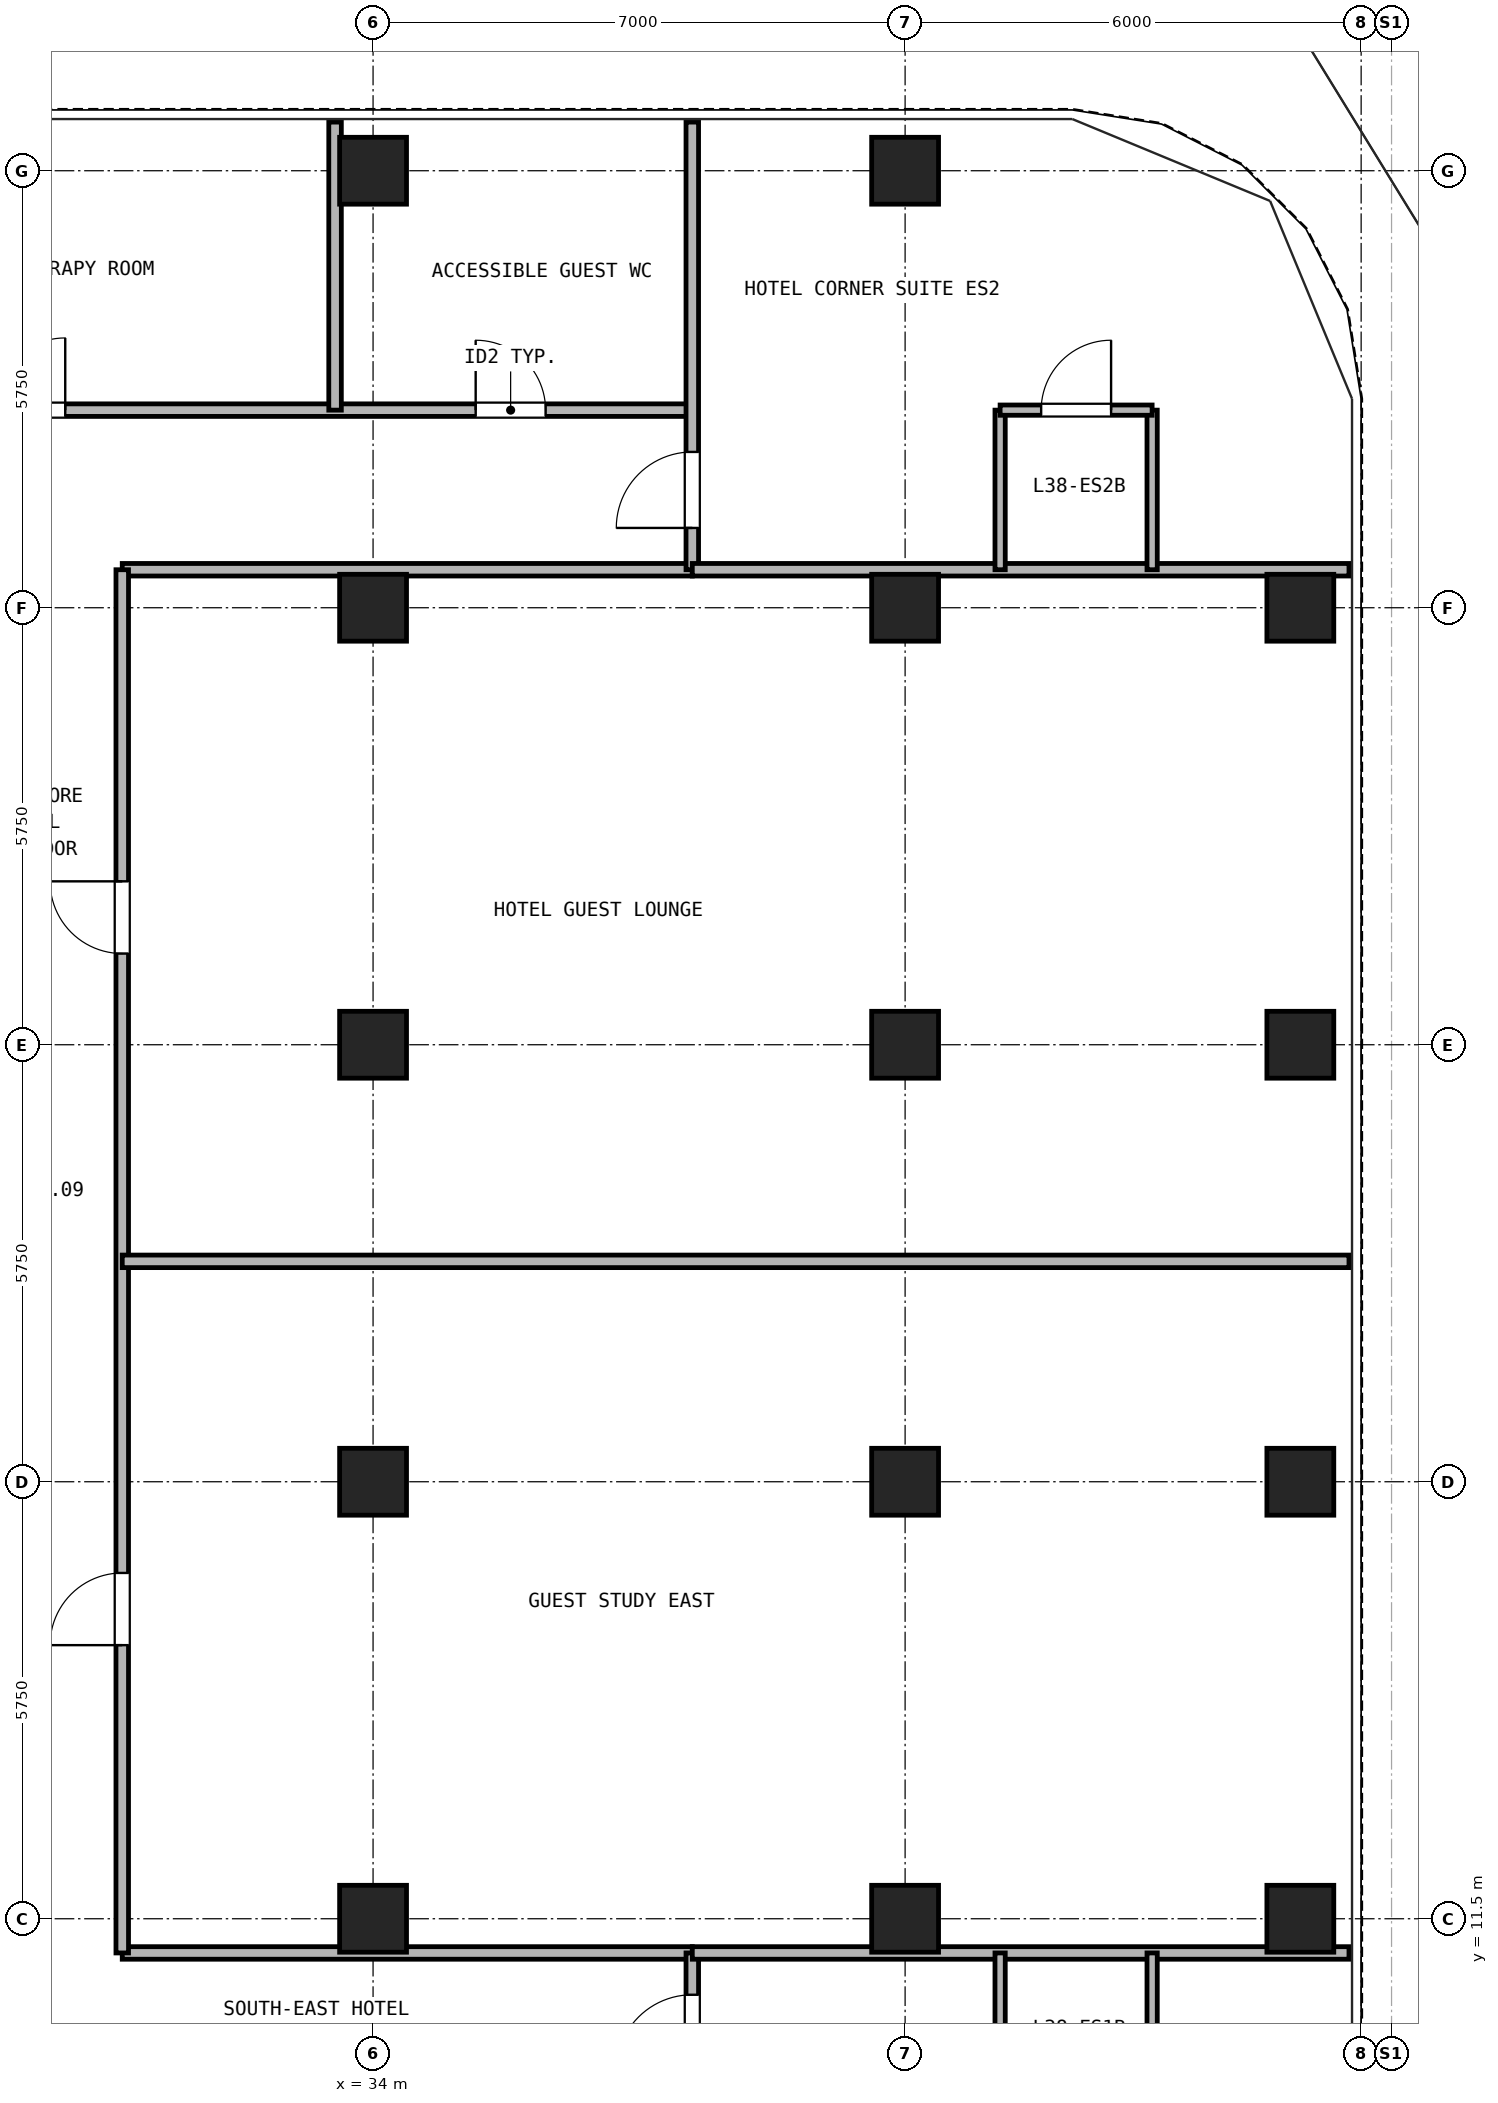
"""IFC4 building model, lengths in metres.
Left out: names, types, materials, properties, quantities, classifications, styles, units other than length and angle.
Written with IfcOpenShell. Run it as: python <this file> out.ifc"""

import sys

from ifc_helpers import new_model, si_unit, direction, frame, frame_2d, origin, origin_2d, place, context, subcontext, project, spatial, rectangle, hollow_rectangle, extrude, source, transform, mapped, element, fill, save


model = new_model("IFC4")
c1 = context("Model", 3, precision=1e-05, world=origin(), true_north=direction((0.0, 1.0)))
c2 = subcontext(c1, "Body", "Model", "MODEL_VIEW")
j1 = project(units=[si_unit("LENGTHUNIT", "METRE"), si_unit("PLANEANGLEUNIT", "RADIAN")], contexts=[c1])
p1 = place(None, origin())
s1 = spatial("IfcSite", under=j1, at=p1, CompositionType="ELEMENT")
p2 = place(p1, origin())
s2 = spatial("IfcBuilding", under=s1, at=p2, CompositionType="ELEMENT")
p3 = place(p2, frame((0.0, 0.0, 137.5)))
s3 = spatial("IfcBuildingStorey", under=s2, at=p3, CompositionType="ELEMENT", Elevation=137.5)
m1 = source(origin(), c2, "Body", "SweptSolid", [
    extrude(hollow_rectangle(XDim=0.88, YDim=0.88, WallThickness=0.05, at=origin_2d()), origin(), (0.0, 0.0, 1.0), 2.95),
])
for number, where, z_axis, x_axis in (
    (1, (34.0, 34.5, 0.0), (0.0, 0.0, 1.0), (1.0, 0.0, 0.0)),
    (2, (41.0, 34.5, 0.0), (0.0, 0.0, 1.0), (1.0, 0.0, 0.0)),
    (3, (46.2, 11.5, 0.0), (0.0, 0.0, 1.0), (1.0, 0.0, 0.0)),
    (4, (46.2, 17.25, 0.0), (0.0, 0.0, 1.0), (1.0, 0.0, 0.0)),
    (5, (46.2, 23.0, 0.0), (0.0, 0.0, 1.0), (1.0, 0.0, 0.0)),
    (6, (46.2, 28.75, 0.0), (0.0, 0.0, 1.0), (1.0, 0.0, 0.0)),
    (7, (34.0, 11.5, 0.0), (0.0, 0.0, 1.0), (1.0, 0.0, 0.0)),
    (8, (34.0, 17.25, 0.0), (0.0, 0.0, 1.0), (1.0, 0.0, 0.0)),
    (9, (34.0, 23.0, 0.0), (0.0, 0.0, 1.0), (1.0, 0.0, 0.0)),
    (10, (34.0, 28.75, 0.0), (0.0, 0.0, 1.0), (1.0, 0.0, 0.0)),
    (11, (41.0, 11.5, 0.0), (0.0, 0.0, 1.0), (1.0, 0.0, 0.0)),
    (12, (41.0, 17.25, 0.0), (0.0, 0.0, 1.0), (1.0, 0.0, 0.0)),
    (13, (41.0, 23.0, 0.0), (0.0, 0.0, 1.0), (1.0, 0.0, 0.0)),
    (14, (41.0, 28.75, 0.0), (0.0, 0.0, 1.0), (1.0, 0.0, 0.0)),
):
    element("IfcColumn", number, at=place(p3, frame(where, z_axis=z_axis, x_axis=x_axis)), inside=s3, PredefinedType="COLUMN", context=c2, shape_type="MappedRepresentation", body=[
        mapped(m1, transform((0.0, 0.0, 0.0), x_axis=(1.0, 0.0, 0.0), y_axis=(0.0, 1.0, 0.0), z_axis=(0.0, 0.0, 1.0), scale=1.0)),
    ])
p4 = place(p3, frame((8.8, 31.35, 0.0), z_axis=(0.0, 0.0, 1.0), x_axis=(1.0, 0.0, 0.0)))
e15 = element("IfcWall", 15, at=p4, inside=s3, PredefinedType="PARTITIONING", context=c2, shape_type="SweptSolid", body=[
    extrude(rectangle(XDim=29.4, YDim=0.165, at=frame_2d((14.7, 0.0))), origin(), (0.0, 0.0, 1.0), 2.95),
])
p5 = place(p4, frame((3.35, 0.0, 0.0)))
e16 = element("IfcOpeningElement", 16, at=p5, cuts=e15, PredefinedType="OPENING", context=c2, shape_type="SweptSolid", body=[
    extrude(rectangle(XDim=0.95, YDim=2.15, at=frame_2d((0.475, 1.075))), frame((0.0, 0.093, 0.0), z_axis=(0.0, -1.0, 0.0), x_axis=(1.0, 0.0, 0.0)), (0.0, 0.0, 1.0), 0.185),
])
p6 = place(p4, frame((11.7, 0.0, 0.0)))
e17 = element("IfcOpeningElement", 17, at=p6, cuts=e15, PredefinedType="OPENING", context=c2, shape_type="SweptSolid", body=[
    extrude(rectangle(XDim=0.95, YDim=2.15, at=frame_2d((0.475, 1.075))), frame((0.0, 0.093, 0.0), z_axis=(0.0, -1.0, 0.0), x_axis=(1.0, 0.0, 0.0)), (0.0, 0.0, 1.0), 0.185),
])
p7 = place(p4, frame((20.2, 0.0, 0.0)))
e18 = element("IfcOpeningElement", 18, at=p7, cuts=e15, PredefinedType="OPENING", context=c2, shape_type="SweptSolid", body=[
    extrude(rectangle(XDim=0.95, YDim=2.15, at=frame_2d((0.475, 1.075))), frame((0.0, 0.093, 0.0), z_axis=(0.0, -1.0, 0.0), x_axis=(1.0, 0.0, 0.0)), (0.0, 0.0, 1.0), 0.185),
])
p8 = place(p4, frame((26.55, 0.0, 0.0)))
e19 = element("IfcOpeningElement", 19, at=p8, cuts=e15, PredefinedType="OPENING", context=c2, shape_type="SweptSolid", body=[
    extrude(rectangle(XDim=0.92, YDim=2.1, at=frame_2d((0.46, 1.05))), frame((0.0, 0.093, 0.0), z_axis=(0.0, -1.0, 0.0), x_axis=(1.0, 0.0, 0.0)), (0.0, 0.0, 1.0), 0.185),
])
for number, where, z_axis, x_axis in (
    (20, (30.7, 11.05, 0.0), (0.0, 0.0, 1.0), (1.0, 0.0, 0.0)),
    (21, (30.7, 29.25, 0.0), (0.0, 0.0, 1.0), (1.0, 0.0, 0.0)),
):
    element("IfcWall", number, at=place(p3, frame(where, z_axis=z_axis, x_axis=x_axis)), inside=s3, PredefinedType="PARTITIONING", context=c2, shape_type="SweptSolid", body=[
        extrude(rectangle(XDim=7.5, YDim=0.165, at=frame_2d((3.75, 0.0))), origin(), (0.0, 0.0, 1.0), 2.95),
    ])
p9 = place(p3, frame((30.7, 11.05, 0.0), z_axis=(0.0, 0.0, 1.0), x_axis=(0.0, 1.0, 0.0)))
e22 = element("IfcWall", 22, at=p9, inside=s3, PredefinedType="PARTITIONING", context=c2, shape_type="SweptSolid", body=[
    extrude(rectangle(XDim=18.2, YDim=0.165, at=frame_2d((9.1, 0.0))), origin(), (0.0, 0.0, 1.0), 2.95),
])
p10 = place(p9, frame((4.05, 0.0, 0.0)))
e23 = element("IfcOpeningElement", 23, at=p10, cuts=e22, PredefinedType="OPENING", context=c2, shape_type="SweptSolid", body=[
    extrude(rectangle(XDim=0.95, YDim=2.15, at=frame_2d((0.475, 1.075))), frame((0.0, 0.093, 0.0), z_axis=(0.0, -1.0, 0.0), x_axis=(1.0, 0.0, 0.0)), (0.0, 0.0, 1.0), 0.185),
])
p11 = place(p9, frame((13.15, 0.0, 0.0)))
e24 = element("IfcOpeningElement", 24, at=p11, cuts=e22, PredefinedType="OPENING", context=c2, shape_type="SweptSolid", body=[
    extrude(rectangle(XDim=0.95, YDim=2.15, at=frame_2d((0.475, 1.075))), frame((0.0, 0.093, 0.0), z_axis=(0.0, -1.0, 0.0), x_axis=(1.0, 0.0, 0.0)), (0.0, 0.0, 1.0), 0.185),
])
p12 = place(p3, frame((38.2, 0.16, 0.0), z_axis=(0.0, 0.0, 1.0), x_axis=(0.0, 1.0, 0.0)))
e25 = element("IfcWall", 25, at=p12, inside=s3, PredefinedType="PARTITIONING", context=c2, shape_type="SweptSolid", body=[
    extrude(rectangle(XDim=10.89, YDim=0.165, at=frame_2d((5.445, 0.0))), origin(), (0.0, 0.0, 1.0), 2.95),
])
p13 = place(p12, frame((9.34, 0.0, 0.0)))
e26 = element("IfcOpeningElement", 26, at=p13, cuts=e25, PredefinedType="OPENING", context=c2, shape_type="SweptSolid", body=[
    extrude(rectangle(XDim=1.0, YDim=2.15, at=frame_2d((0.5, 1.075))), frame((0.0, 0.093, 0.0), z_axis=(0.0, -1.0, 0.0), x_axis=(1.0, 0.0, 0.0)), (0.0, 0.0, 1.0), 0.185),
])
p14 = place(p3, frame((38.2, 29.25, 0.0), z_axis=(0.0, 0.0, 1.0), x_axis=(0.0, 1.0, 0.0)))
e27 = element("IfcWall", 27, at=p14, inside=s3, PredefinedType="PARTITIONING", context=c2, shape_type="SweptSolid", body=[
    extrude(rectangle(XDim=5.89, YDim=0.165, at=frame_2d((2.945, 0.0))), origin(), (0.0, 0.0, 1.0), 2.95),
])
p15 = place(p14, frame((0.55, 0.0, 0.0)))
e28 = element("IfcOpeningElement", 28, at=p15, cuts=e27, PredefinedType="OPENING", context=c2, shape_type="SweptSolid", body=[
    extrude(rectangle(XDim=1.0, YDim=2.15, at=frame_2d((0.5, 1.075))), frame((0.0, 0.093, 0.0), z_axis=(0.0, -1.0, 0.0), x_axis=(1.0, 0.0, 0.0)), (0.0, 0.0, 1.0), 0.185),
])
for number, where, z_axis, x_axis in (
    (29, (38.2, 11.05, 0.0), (0.0, 0.0, 1.0), (1.0, 0.0, 0.0)),
    (30, (38.2, 29.25, 0.0), (0.0, 0.0, 1.0), (1.0, 0.0, 0.0)),
):
    element("IfcWall", number, at=place(p3, frame(where, z_axis=z_axis, x_axis=x_axis)), inside=s3, PredefinedType="PARTITIONING", context=c2, shape_type="SweptSolid", body=[
        extrude(rectangle(XDim=8.64, YDim=0.165, at=frame_2d((4.32, 0.0))), origin(), (0.0, 0.0, 1.0), 2.95),
    ])
for number, where, z_axis, x_axis in (
    (31, (42.25, 8.95, 0.0), (0.0, 0.0, 1.0), (0.0, 1.0, 0.0)),
    (32, (44.25, 8.95, 0.0), (0.0, 0.0, 1.0), (0.0, 1.0, 0.0)),
    (33, (42.25, 29.25, 0.0), (0.0, 0.0, 1.0), (0.0, 1.0, 0.0)),
    (34, (44.25, 29.25, 0.0), (0.0, 0.0, 1.0), (0.0, 1.0, 0.0)),
):
    element("IfcWall", number, at=place(p3, frame(where, z_axis=z_axis, x_axis=x_axis)), inside=s3, PredefinedType="PARTITIONING", context=c2, shape_type="SweptSolid", body=[
        extrude(rectangle(XDim=2.1, YDim=0.135, at=frame_2d((1.05, 0.0))), origin(), (0.0, 0.0, 1.0), 2.95),
    ])
p16 = place(p3, frame((42.25, 31.35, 0.0), z_axis=(0.0, 0.0, 1.0), x_axis=(1.0, 0.0, 0.0)))
e35 = element("IfcWall", 35, at=p16, inside=s3, PredefinedType="PARTITIONING", context=c2, shape_type="SweptSolid", body=[
    extrude(rectangle(XDim=2.0, YDim=0.135, at=frame_2d((1.0, 0.0))), origin(), (0.0, 0.0, 1.0), 2.95),
])
p17 = place(p16, frame((0.54, 0.0, 0.0)))
e36 = element("IfcOpeningElement", 36, at=p17, cuts=e35, PredefinedType="OPENING", context=c2, shape_type="SweptSolid", body=[
    extrude(rectangle(XDim=0.92, YDim=2.1, at=frame_2d((0.46, 1.05))), frame((0.0, 0.077, 0.0), z_axis=(0.0, -1.0, 0.0), x_axis=(1.0, 0.0, 0.0)), (0.0, 0.0, 1.0), 0.155),
])
p18 = place(p3, frame((33.5, 31.35, 0.0), z_axis=(0.0, 0.0, 1.0), x_axis=(0.0, 1.0, 0.0)))
e37 = element("IfcWall", 37, at=p18, inside=s3, PredefinedType="PARTITIONING", context=c2, shape_type="SweptSolid", body=[
    extrude(rectangle(XDim=3.79, YDim=0.165, at=frame_2d((1.895, 0.0))), origin(), (0.0, 0.0, 1.0), 2.95),
])
p19 = place(p3, frame((30.7, 20.15, 0.0), z_axis=(0.0, 0.0, 1.0), x_axis=(1.0, 0.0, 0.0)))
e38 = element("IfcWall", 38, at=p19, inside=s3, PredefinedType="PARTITIONING", context=c2, shape_type="SweptSolid", body=[
    extrude(rectangle(XDim=16.14, YDim=0.165, at=frame_2d((8.07, 0.0))), origin(), (0.0, 0.0, 1.0), 2.583),
])
p20 = place(p13, frame((1.0, 0.0, 0.0), z_axis=(0.0, 0.0, 1.0), x_axis=(-1.0, 0.0, 0.0)))
e39 = element("IfcDoor", 39, at=p20, inside=s3, OperationType="SINGLE_SWING_LEFT", PredefinedType="DOOR", context=c2, shape_type="SweptSolid", body=[
    extrude(rectangle(XDim=1.0, YDim=2.15, at=frame_2d((0.5, 1.075))), frame((0.0, 0.025, 0.0), z_axis=(0.0, -1.0, 0.0), x_axis=(1.0, 0.0, 0.0)), (0.0, 0.0, 1.0), 0.05),
])
fill(e26, e39)
p21 = place(p17, frame((0.92, 0.0, 0.0), z_axis=(0.0, 0.0, 1.0), x_axis=(-1.0, 0.0, 0.0)))
e40 = element("IfcDoor", 40, at=p21, inside=s3, OperationType="SINGLE_SWING_RIGHT", PredefinedType="DOOR", context=c2, shape_type="SweptSolid", body=[
    extrude(rectangle(XDim=0.92, YDim=2.1, at=frame_2d((0.46, 1.05))), frame((0.0, 0.025, 0.0), z_axis=(0.0, -1.0, 0.0), x_axis=(1.0, 0.0, 0.0)), (0.0, 0.0, 1.0), 0.05),
])
fill(e36, e40)
p22 = place(p15, frame((1.0, 0.0, 0.0), z_axis=(0.0, 0.0, 1.0), x_axis=(-1.0, 0.0, 0.0)))
e41 = element("IfcDoor", 41, at=p22, inside=s3, OperationType="SINGLE_SWING_LEFT", PredefinedType="DOOR", context=c2, shape_type="SweptSolid", body=[
    extrude(rectangle(XDim=1.0, YDim=2.15, at=frame_2d((0.5, 1.075))), frame((0.0, 0.025, 0.0), z_axis=(0.0, -1.0, 0.0), x_axis=(1.0, 0.0, 0.0)), (0.0, 0.0, 1.0), 0.05),
])
fill(e28, e41)
p23 = place(p7, origin())
e42 = element("IfcDoor", 42, at=p23, inside=s3, OperationType="SINGLE_SWING_RIGHT", PredefinedType="DOOR", context=c2, shape_type="SweptSolid", body=[
    extrude(rectangle(XDim=0.95, YDim=2.15, at=frame_2d((0.475, 1.075))), frame((0.0, 0.025, 0.0), z_axis=(0.0, -1.0, 0.0), x_axis=(1.0, 0.0, 0.0)), (0.0, 0.0, 1.0), 0.05),
])
fill(e18, e42)
p24 = place(p8, origin())
e43 = element("IfcDoor", 43, at=p24, inside=s3, OperationType="SINGLE_SWING_LEFT", PredefinedType="DOOR", context=c2, shape_type="SweptSolid", body=[
    extrude(rectangle(XDim=0.92, YDim=2.1, at=frame_2d((0.46, 1.05))), frame((0.0, 0.025, 0.0), z_axis=(0.0, -1.0, 0.0), x_axis=(1.0, 0.0, 0.0)), (0.0, 0.0, 1.0), 0.05),
])
fill(e19, e43)
p25 = place(p10, origin())
e44 = element("IfcDoor", 44, at=p25, inside=s3, OperationType="SINGLE_SWING_LEFT", PredefinedType="DOOR", context=c2, shape_type="SweptSolid", body=[
    extrude(rectangle(XDim=0.95, YDim=2.15, at=frame_2d((0.475, 1.075))), frame((0.0, 0.025, 0.0), z_axis=(0.0, -1.0, 0.0), x_axis=(1.0, 0.0, 0.0)), (0.0, 0.0, 1.0), 0.05),
])
fill(e23, e44)
p26 = place(p11, origin())
e45 = element("IfcDoor", 45, at=p26, inside=s3, OperationType="SINGLE_SWING_RIGHT", PredefinedType="DOOR", context=c2, shape_type="SweptSolid", body=[
    extrude(rectangle(XDim=0.95, YDim=2.15, at=frame_2d((0.475, 1.075))), frame((0.0, 0.025, 0.0), z_axis=(0.0, -1.0, 0.0), x_axis=(1.0, 0.0, 0.0)), (0.0, 0.0, 1.0), 0.05),
])
fill(e24, e45)
save(model, sys.argv[1])
